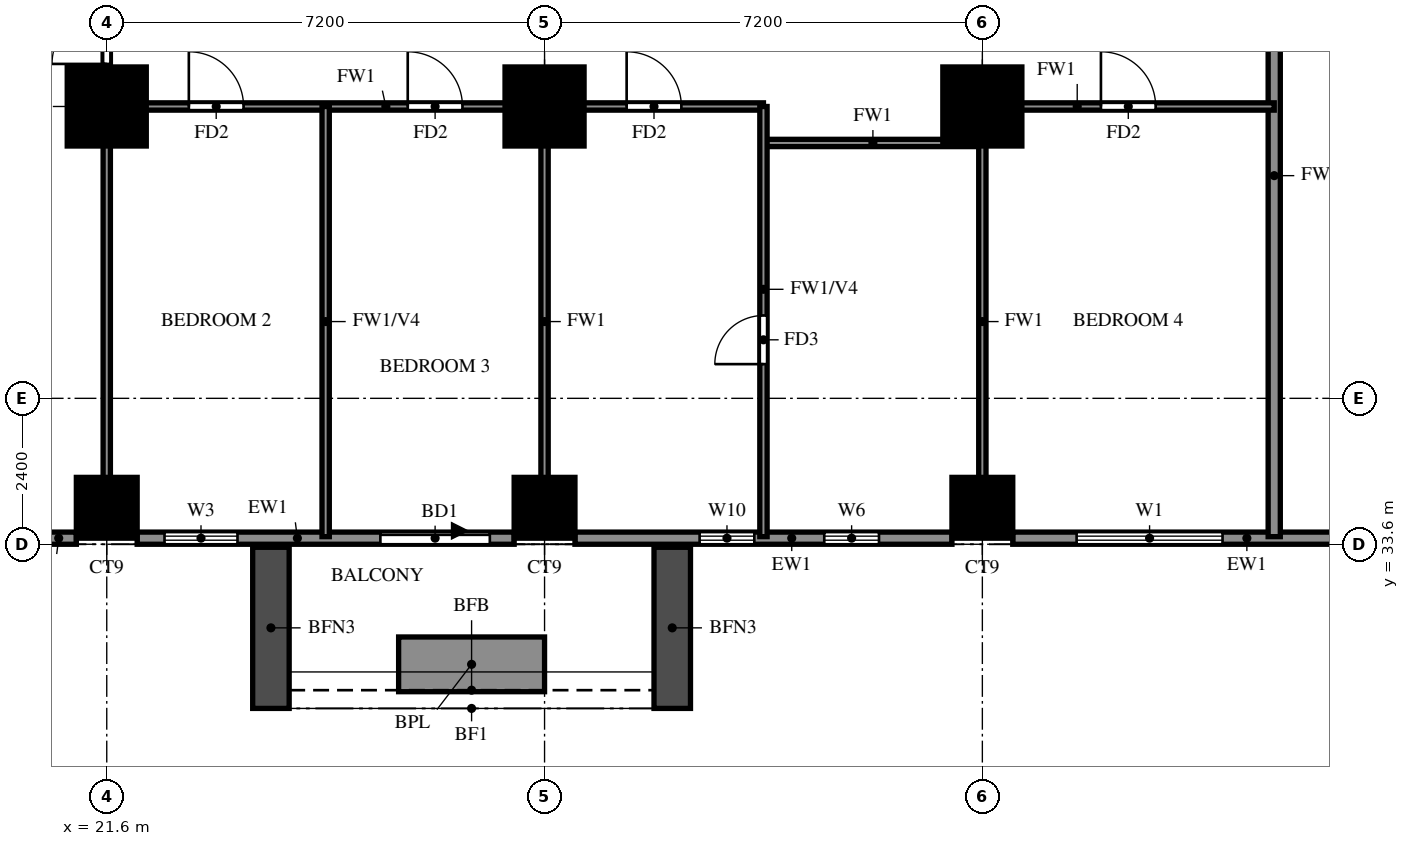
"""IFC4 building model, lengths in metres.
Left out: names, types, materials, properties, quantities, classifications, styles, units other than length and angle.
Written with IfcOpenShell. Run it as: python <this file> out.ifc"""

import sys

from ifc_helpers import new_model, si_unit, direction, frame, frame_2d, origin, origin_2d, place, context, subcontext, project, spatial, rectangle, extrude, source, transform, mapped, element, fill, save


model = new_model("IFC4")
c1 = context("Model", 3, precision=1e-05, world=origin(), true_north=direction((0.0, 1.0)))
c2 = subcontext(c1, "Body", "Model", "MODEL_VIEW")
j1 = project(units=[si_unit("LENGTHUNIT", "METRE"), si_unit("PLANEANGLEUNIT", "RADIAN")], contexts=[c1])
p1 = place(None, origin())
s1 = spatial("IfcSite", under=j1, at=p1, CompositionType="ELEMENT")
p2 = place(p1, origin())
s2 = spatial("IfcBuilding", under=s1, at=p2, CompositionType="ELEMENT")
p3 = place(p2, frame((0.0, 0.0, 69.0)))
s3 = spatial("IfcBuildingStorey", under=s2, at=p3, CompositionType="ELEMENT", Elevation=69.0)
m1 = source(origin(), c2, "Body", "SweptSolid", [
    extrude(rectangle(XDim=1.0, YDim=1.0, at=origin_2d()), origin(), (0.0, 0.0, 1.0), 3.18),
])
for number, where, z_axis, x_axis in (
    (1, (21.6, 34.2, 0.0), (0.0, 0.0, 1.0), (1.0, 0.0, 0.0)),
    (2, (28.8, 34.2, 0.0), (0.0, 0.0, 1.0), (1.0, 0.0, 0.0)),
    (3, (36.0, 34.2, 0.0), (0.0, 0.0, 1.0), (1.0, 0.0, 0.0)),
):
    element("IfcColumn", number, at=place(p3, frame(where, z_axis=z_axis, x_axis=x_axis)), inside=s3, PredefinedType="COLUMN", context=c2, shape_type="MappedRepresentation", body=[
        mapped(m1, transform((0.0, 0.0, 0.0))),
    ])
m2 = source(origin(), c2, "Body", "SweptSolid", [
    extrude(rectangle(XDim=1.3, YDim=1.3, at=origin_2d()), origin(), (0.0, 0.0, 1.0), 3.18),
])
for number, where, z_axis, x_axis in (
    (4, (21.6, 40.8, 0.0), (0.0, 0.0, 1.0), (1.0, 0.0, 0.0)),
    (5, (28.8, 40.8, 0.0), (0.0, 0.0, 1.0), (1.0, 0.0, 0.0)),
    (6, (36.0, 40.8, 0.0), (0.0, 0.0, 1.0), (1.0, 0.0, 0.0)),
):
    element("IfcColumn", number, at=place(p3, frame(where, z_axis=z_axis, x_axis=x_axis)), inside=s3, PredefinedType="COLUMN", context=c2, shape_type="MappedRepresentation", body=[
        mapped(m2, transform((0.0, 0.0, 0.0))),
    ])
p4 = place(p3, frame((18.2, 33.7, 0.0), z_axis=(0.0, 0.0, 1.0), x_axis=(1.0, 0.0, 0.0)))
e7 = element("IfcWall", 7, at=p4, inside=s3, PredefinedType="SOLIDWALL", context=c2, shape_type="SweptSolid", body=[
    extrude(rectangle(XDim=2.9, YDim=0.2, at=frame_2d((1.45, 0.0))), origin(), (0.0, 0.0, 1.0), 3.18),
])
p5 = place(p4, frame((0.55, 0.0, 0.6)))
e8 = element("IfcOpeningElement", 8, at=p5, cuts=e7, PredefinedType="OPENING", context=c2, shape_type="SweptSolid", body=[
    extrude(rectangle(XDim=1.8, YDim=2.4, at=frame_2d((0.9, 1.2))), frame((0.0, 0.11, 0.0), z_axis=(0.0, -1.0, 0.0), x_axis=(1.0, 0.0, 0.0)), (0.0, 0.0, 1.0), 0.22),
])
p6 = place(p3, frame((22.1, 33.7, 0.0), z_axis=(0.0, 0.0, 1.0), x_axis=(1.0, 0.0, 0.0)))
e9 = element("IfcWall", 9, at=p6, inside=s3, PredefinedType="SOLIDWALL", context=c2, shape_type="SweptSolid", body=[
    extrude(rectangle(XDim=6.2, YDim=0.2, at=frame_2d((3.1, 0.0))), origin(), (0.0, 0.0, 1.0), 3.18),
])
p7 = place(p6, frame((4.0, 0.0, 0.0)))
e10 = element("IfcOpeningElement", 10, at=p7, cuts=e9, PredefinedType="OPENING", context=c2, shape_type="SweptSolid", body=[
    extrude(rectangle(XDim=1.8, YDim=2.4, at=frame_2d((0.9, 1.2))), frame((0.0, 0.11, 0.0), z_axis=(0.0, -1.0, 0.0), x_axis=(1.0, 0.0, 0.0)), (0.0, 0.0, 1.0), 0.22),
])
p8 = place(p6, frame((0.45, 0.0, 0.6)))
e11 = element("IfcOpeningElement", 11, at=p8, cuts=e9, PredefinedType="OPENING", context=c2, shape_type="SweptSolid", body=[
    extrude(rectangle(XDim=1.2, YDim=2.4, at=frame_2d((0.6, 1.2))), frame((0.0, 0.11, 0.0), z_axis=(0.0, -1.0, 0.0), x_axis=(1.0, 0.0, 0.0)), (0.0, 0.0, 1.0), 0.22),
])
p9 = place(p3, frame((29.3, 33.7, 0.0), z_axis=(0.0, 0.0, 1.0), x_axis=(1.0, 0.0, 0.0)))
e12 = element("IfcWall", 12, at=p9, inside=s3, PredefinedType="SOLIDWALL", context=c2, shape_type="SweptSolid", body=[
    extrude(rectangle(XDim=6.2, YDim=0.2, at=frame_2d((3.1, 0.0))), origin(), (0.0, 0.0, 1.0), 3.18),
])
p10 = place(p9, frame((2.05, 0.0, 0.6)))
e13 = element("IfcOpeningElement", 13, at=p10, cuts=e12, PredefinedType="OPENING", context=c2, shape_type="SweptSolid", body=[
    extrude(rectangle(XDim=0.9, YDim=2.4, at=frame_2d((0.45, 1.2))), frame((0.0, 0.11, 0.0), z_axis=(0.0, -1.0, 0.0), x_axis=(1.0, 0.0, 0.0)), (0.0, 0.0, 1.0), 0.22),
])
p11 = place(p9, frame((4.1, 0.0, 1.5)))
e14 = element("IfcOpeningElement", 14, at=p11, cuts=e12, PredefinedType="OPENING", context=c2, shape_type="SweptSolid", body=[
    extrude(rectangle(XDim=0.9, YDim=0.9, at=frame_2d((0.45, 0.45))), frame((0.0, 0.11, 0.0), z_axis=(0.0, -1.0, 0.0), x_axis=(1.0, 0.0, 0.0)), (0.0, 0.0, 1.0), 0.22),
])
p12 = place(p3, frame((36.5, 33.7, 0.0), z_axis=(0.0, 0.0, 1.0), x_axis=(1.0, 0.0, 0.0)))
e15 = element("IfcWall", 15, at=p12, inside=s3, PredefinedType="SOLIDWALL", context=c2, shape_type="SweptSolid", body=[
    extrude(rectangle(XDim=5.5, YDim=0.2, at=frame_2d((2.75, 0.0))), origin(), (0.0, 0.0, 1.0), 3.18),
])
p13 = place(p12, frame((1.05, 0.0, 0.6)))
e16 = element("IfcOpeningElement", 16, at=p13, cuts=e15, PredefinedType="OPENING", context=c2, shape_type="SweptSolid", body=[
    extrude(rectangle(XDim=2.4, YDim=2.4, at=frame_2d((1.2, 1.2))), frame((0.0, 0.11, 0.0), z_axis=(0.0, -1.0, 0.0), x_axis=(1.0, 0.0, 0.0)), (0.0, 0.0, 1.0), 0.22),
])
for number, where, z_axis, x_axis in (
    (17, (24.3, 33.55, 0.0), (0.0, 0.0, 1.0), (0.0, -1.0, 0.0)),
    (18, (30.9, 33.55, 0.0), (0.0, 0.0, 1.0), (0.0, -1.0, 0.0)),
):
    element("IfcWall", number, at=place(p3, frame(where, z_axis=z_axis, x_axis=x_axis)), inside=s3, PredefinedType="SOLIDWALL", context=c2, shape_type="SweptSolid", body=[
        extrude(rectangle(XDim=2.65, YDim=0.6, at=frame_2d((1.325, 0.0))), origin(), (0.0, 0.0, 1.0), 2.85),
    ])
p14 = place(p3, frame((26.4, 31.625, 0.0), z_axis=(0.0, 0.0, 1.0), x_axis=(1.0, 0.0, 0.0)))
e19 = element("IfcWall", 19, at=p14, inside=s3, PredefinedType="SOLIDWALL", context=c2, shape_type="SweptSolid", body=[
    extrude(rectangle(XDim=2.4, YDim=0.9, at=frame_2d((1.2, 0.0))), origin(), (0.0, 0.0, 1.0), 0.9),
])
p15 = place(p3, frame((40.8, 33.725, 0.0), z_axis=(0.0, 0.0, 1.0), x_axis=(0.0, 1.0, 0.0)))
e20 = element("IfcWall", 20, at=p15, inside=s3, PredefinedType="SOLIDWALL", context=c2, shape_type="SweptSolid", body=[
    extrude(rectangle(XDim=11.875, YDim=0.2, at=frame_2d((5.938, 0.0))), origin(), (0.0, 0.0, 1.0), 2.28),
])
p16 = place(p15, frame((10.025, 0.0, 0.0)))
e21 = element("IfcOpeningElement", 21, at=p16, cuts=e20, PredefinedType="OPENING", context=c2, shape_type="SweptSolid", body=[
    extrude(rectangle(XDim=1.0, YDim=2.1, at=frame_2d((0.5, 1.05))), frame((0.0, 0.11, 0.0), z_axis=(0.0, -1.0, 0.0), x_axis=(1.0, 0.0, 0.0)), (0.0, 0.0, 1.0), 0.22),
])
p17 = place(p3, frame((32.4, 40.2, 0.0), z_axis=(0.0, 0.0, 1.0), x_axis=(1.0, 0.0, 0.0)))
e22 = element("IfcWall", 22, at=p17, inside=s3, PredefinedType="PARTITIONING", context=c2, shape_type="SweptSolid", body=[
    extrude(rectangle(XDim=3.6, YDim=0.12, at=frame_2d((1.8, 0.0))), origin(), (0.0, 0.0, 1.0), 3.18),
])
p18 = place(p3, frame((21.6, 40.8, 0.0), z_axis=(0.0, 0.0, 1.0), x_axis=(1.0, 0.0, 0.0)))
e23 = element("IfcWall", 23, at=p18, inside=s3, PredefinedType="PARTITIONING", context=c2, shape_type="SweptSolid", body=[
    extrude(rectangle(XDim=10.8, YDim=0.12, at=frame_2d((5.4, 0.0))), origin(), (0.0, 0.0, 1.0), 3.18),
])
p19 = place(p18, frame((1.35, 0.0, 0.0)))
e24 = element("IfcOpeningElement", 24, at=p19, cuts=e23, PredefinedType="OPENING", context=c2, shape_type="SweptSolid", body=[
    extrude(rectangle(XDim=0.9, YDim=2.1, at=frame_2d((0.45, 1.05))), frame((0.0, 0.07, 0.0), z_axis=(0.0, -1.0, 0.0), x_axis=(1.0, 0.0, 0.0)), (0.0, 0.0, 1.0), 0.14),
])
p20 = place(p18, frame((4.95, 0.0, 0.0)))
e25 = element("IfcOpeningElement", 25, at=p20, cuts=e23, PredefinedType="OPENING", context=c2, shape_type="SweptSolid", body=[
    extrude(rectangle(XDim=0.9, YDim=2.1, at=frame_2d((0.45, 1.05))), frame((0.0, 0.07, 0.0), z_axis=(0.0, -1.0, 0.0), x_axis=(1.0, 0.0, 0.0)), (0.0, 0.0, 1.0), 0.14),
])
p21 = place(p18, frame((8.55, 0.0, 0.0)))
e26 = element("IfcOpeningElement", 26, at=p21, cuts=e23, PredefinedType="OPENING", context=c2, shape_type="SweptSolid", body=[
    extrude(rectangle(XDim=0.9, YDim=2.1, at=frame_2d((0.45, 1.05))), frame((0.0, 0.07, 0.0), z_axis=(0.0, -1.0, 0.0), x_axis=(1.0, 0.0, 0.0)), (0.0, 0.0, 1.0), 0.14),
])
p22 = place(p3, frame((36.0, 40.8, 0.0), z_axis=(0.0, 0.0, 1.0), x_axis=(1.0, 0.0, 0.0)))
e27 = element("IfcWall", 27, at=p22, inside=s3, PredefinedType="PARTITIONING", context=c2, shape_type="SweptSolid", body=[
    extrude(rectangle(XDim=4.8, YDim=0.12, at=frame_2d((2.4, 0.0))), origin(), (0.0, 0.0, 1.0), 3.18),
])
p23 = place(p22, frame((1.95, 0.0, 0.0)))
e28 = element("IfcOpeningElement", 28, at=p23, cuts=e27, PredefinedType="OPENING", context=c2, shape_type="SweptSolid", body=[
    extrude(rectangle(XDim=0.9, YDim=2.1, at=frame_2d((0.45, 1.05))), frame((0.0, 0.07, 0.0), z_axis=(0.0, -1.0, 0.0), x_axis=(1.0, 0.0, 0.0)), (0.0, 0.0, 1.0), 0.14),
])
p24 = place(p3, frame((21.6, 33.725, 0.0), z_axis=(0.0, 0.0, 1.0), x_axis=(0.0, 1.0, 0.0)))
e29 = element("IfcWall", 29, at=p24, inside=s3, PredefinedType="PARTITIONING", context=c2, shape_type="SweptSolid", body=[
    extrude(rectangle(XDim=39.475, YDim=0.12, at=frame_2d((19.737, 0.0))), origin(), (0.0, 0.0, 1.0), 3.18),
])
p25 = place(p24, frame((7.775, 0.0, 0.0)))
e30 = element("IfcOpeningElement", 30, at=p25, cuts=e29, PredefinedType="OPENING", context=c2, shape_type="SweptSolid", body=[
    extrude(rectangle(XDim=0.9, YDim=2.1, at=frame_2d((0.45, 1.05))), frame((0.0, 0.07, 0.0), z_axis=(0.0, -1.0, 0.0), x_axis=(1.0, 0.0, 0.0)), (0.0, 0.0, 1.0), 0.14),
])
p26 = place(p24, frame((15.625, 0.0, 0.0)))
e31 = element("IfcOpeningElement", 31, at=p26, cuts=e29, PredefinedType="OPENING", context=c2, shape_type="SweptSolid", body=[
    extrude(rectangle(XDim=0.9, YDim=2.1, at=frame_2d((0.45, 1.05))), frame((0.0, 0.07, 0.0), z_axis=(0.0, -1.0, 0.0), x_axis=(1.0, 0.0, 0.0)), (0.0, 0.0, 1.0), 0.14),
])
p27 = place(p24, frame((19.225, 0.0, 0.0)))
e32 = element("IfcOpeningElement", 32, at=p27, cuts=e29, PredefinedType="OPENING", context=c2, shape_type="SweptSolid", body=[
    extrude(rectangle(XDim=0.9, YDim=2.1, at=frame_2d((0.45, 1.05))), frame((0.0, 0.07, 0.0), z_axis=(0.0, -1.0, 0.0), x_axis=(1.0, 0.0, 0.0)), (0.0, 0.0, 1.0), 0.14),
])
p28 = place(p24, frame((24.325, 0.0, 0.0)))
e33 = element("IfcOpeningElement", 33, at=p28, cuts=e29, PredefinedType="OPENING", context=c2, shape_type="SweptSolid", body=[
    extrude(rectangle(XDim=1.5, YDim=2.1, at=frame_2d((0.75, 1.05))), frame((0.0, 0.07, 0.0), z_axis=(0.0, -1.0, 0.0), x_axis=(1.0, 0.0, 0.0)), (0.0, 0.0, 1.0), 0.14),
])
p29 = place(p24, frame((30.025, 0.0, 0.0)))
e34 = element("IfcOpeningElement", 34, at=p29, cuts=e29, PredefinedType="OPENING", context=c2, shape_type="SweptSolid", body=[
    extrude(rectangle(XDim=0.9, YDim=2.1, at=frame_2d((0.45, 1.05))), frame((0.0, 0.07, 0.0), z_axis=(0.0, -1.0, 0.0), x_axis=(1.0, 0.0, 0.0)), (0.0, 0.0, 1.0), 0.14),
])
p30 = place(p24, frame((33.625, 0.0, 0.0)))
e35 = element("IfcOpeningElement", 35, at=p30, cuts=e29, PredefinedType="OPENING", context=c2, shape_type="SweptSolid", body=[
    extrude(rectangle(XDim=0.9, YDim=2.1, at=frame_2d((0.45, 1.05))), frame((0.0, 0.07, 0.0), z_axis=(0.0, -1.0, 0.0), x_axis=(1.0, 0.0, 0.0)), (0.0, 0.0, 1.0), 0.14),
])
p31 = place(p24, frame((37.225, 0.0, 0.0)))
e36 = element("IfcOpeningElement", 36, at=p31, cuts=e29, PredefinedType="OPENING", context=c2, shape_type="SweptSolid", body=[
    extrude(rectangle(XDim=0.9, YDim=2.1, at=frame_2d((0.45, 1.05))), frame((0.0, 0.07, 0.0), z_axis=(0.0, -1.0, 0.0), x_axis=(1.0, 0.0, 0.0)), (0.0, 0.0, 1.0), 0.14),
])
p32 = place(p3, frame((25.2, 33.725, 0.0), z_axis=(0.0, 0.0, 1.0), x_axis=(0.0, 1.0, 0.0)))
e37 = element("IfcWall", 37, at=p32, inside=s3, PredefinedType="PARTITIONING", context=c2, shape_type="SweptSolid", body=[
    extrude(rectangle(XDim=7.075, YDim=0.12, at=frame_2d((3.538, 0.0))), origin(), (0.0, 0.0, 1.0), 2.28),
])
p33 = place(p3, frame((28.8, 33.725, 0.0), z_axis=(0.0, 0.0, 1.0), x_axis=(0.0, 1.0, 0.0)))
e38 = element("IfcWall", 38, at=p33, inside=s3, PredefinedType="PARTITIONING", context=c2, shape_type="SweptSolid", body=[
    extrude(rectangle(XDim=7.075, YDim=0.12, at=frame_2d((3.538, 0.0))), origin(), (0.0, 0.0, 1.0), 3.18),
])
p34 = place(p3, frame((32.4, 33.725, 0.0), z_axis=(0.0, 0.0, 1.0), x_axis=(0.0, 1.0, 0.0)))
e39 = element("IfcWall", 39, at=p34, inside=s3, PredefinedType="PARTITIONING", context=c2, shape_type="SweptSolid", body=[
    extrude(rectangle(XDim=7.075, YDim=0.12, at=frame_2d((3.538, 0.0))), origin(), (0.0, 0.0, 1.0), 2.28),
])
p35 = place(p34, frame((2.837, 0.0, 0.0)))
e40 = element("IfcOpeningElement", 40, at=p35, cuts=e39, PredefinedType="OPENING", context=c2, shape_type="SweptSolid", body=[
    extrude(rectangle(XDim=0.8, YDim=2.1, at=frame_2d((0.4, 1.05))), frame((0.0, 0.07, 0.0), z_axis=(0.0, -1.0, 0.0), x_axis=(1.0, 0.0, 0.0)), (0.0, 0.0, 1.0), 0.14),
])
p36 = place(p3, frame((36.0, 33.725, 0.0), z_axis=(0.0, 0.0, 1.0), x_axis=(0.0, 1.0, 0.0)))
e41 = element("IfcWall", 41, at=p36, inside=s3, PredefinedType="PARTITIONING", context=c2, shape_type="SweptSolid", body=[
    extrude(rectangle(XDim=7.075, YDim=0.12, at=frame_2d((3.538, 0.0))), origin(), (0.0, 0.0, 1.0), 3.18),
])
p37 = place(p7, origin())
e42 = element("IfcDoor", 42, at=p37, inside=s3, OperationType="DOUBLE_DOOR_SLIDING", PredefinedType="DOOR", context=c2, shape_type="SweptSolid", body=[
    extrude(rectangle(XDim=1.8, YDim=2.4, at=frame_2d((0.9, 1.2))), frame((0.0, 0.025, 0.0), z_axis=(0.0, -1.0, 0.0), x_axis=(1.0, 0.0, 0.0)), (0.0, 0.0, 1.0), 0.05),
])
fill(e10, e42)
p38 = place(p8, origin())
e43 = element("IfcWindow", 43, at=p38, inside=s3, PartitioningType="SINGLE_PANEL", PredefinedType="WINDOW", context=c2, shape_type="SweptSolid", body=[
    extrude(rectangle(XDim=1.2, YDim=2.4, at=frame_2d((0.6, 1.2))), frame((0.0, 0.03, 0.0), z_axis=(0.0, -1.0, 0.0), x_axis=(1.0, 0.0, 0.0)), (0.0, 0.0, 1.0), 0.06),
])
fill(e11, e43)
p39 = place(p10, origin())
e44 = element("IfcWindow", 44, at=p39, inside=s3, PartitioningType="SINGLE_PANEL", PredefinedType="WINDOW", context=c2, shape_type="SweptSolid", body=[
    extrude(rectangle(XDim=0.9, YDim=2.4, at=frame_2d((0.45, 1.2))), frame((0.0, 0.03, 0.0), z_axis=(0.0, -1.0, 0.0), x_axis=(1.0, 0.0, 0.0)), (0.0, 0.0, 1.0), 0.06),
])
fill(e13, e44)
p40 = place(p11, origin())
e45 = element("IfcWindow", 45, at=p40, inside=s3, PartitioningType="SINGLE_PANEL", PredefinedType="WINDOW", context=c2, shape_type="SweptSolid", body=[
    extrude(rectangle(XDim=0.9, YDim=0.9, at=frame_2d((0.45, 0.45))), frame((0.0, 0.03, 0.0), z_axis=(0.0, -1.0, 0.0), x_axis=(1.0, 0.0, 0.0)), (0.0, 0.0, 1.0), 0.06),
])
fill(e14, e45)
p41 = place(p13, origin())
e46 = element("IfcWindow", 46, at=p41, inside=s3, PartitioningType="DOUBLE_PANEL_VERTICAL", PredefinedType="WINDOW", context=c2, shape_type="SweptSolid", body=[
    extrude(rectangle(XDim=2.4, YDim=2.4, at=frame_2d((1.2, 1.2))), frame((0.0, 0.03, 0.0), z_axis=(0.0, -1.0, 0.0), x_axis=(1.0, 0.0, 0.0)), (0.0, 0.0, 1.0), 0.06),
])
fill(e16, e46)
p42 = place(p25, origin())
e47 = element("IfcDoor", 47, at=p42, inside=s3, OperationType="SINGLE_SWING_LEFT", PredefinedType="DOOR", context=c2, shape_type="SweptSolid", body=[
    extrude(rectangle(XDim=0.9, YDim=2.1, at=frame_2d((0.45, 1.05))), frame((0.0, 0.025, 0.0), z_axis=(0.0, -1.0, 0.0), x_axis=(1.0, 0.0, 0.0)), (0.0, 0.0, 1.0), 0.05),
])
fill(e30, e47)
p43 = place(p19, origin())
e48 = element("IfcDoor", 48, at=p43, inside=s3, OperationType="SINGLE_SWING_LEFT", PredefinedType="DOOR", context=c2, shape_type="SweptSolid", body=[
    extrude(rectangle(XDim=0.9, YDim=2.1, at=frame_2d((0.45, 1.05))), frame((0.0, 0.025, 0.0), z_axis=(0.0, -1.0, 0.0), x_axis=(1.0, 0.0, 0.0)), (0.0, 0.0, 1.0), 0.05),
])
fill(e24, e48)
p44 = place(p20, origin())
e49 = element("IfcDoor", 49, at=p44, inside=s3, OperationType="SINGLE_SWING_LEFT", PredefinedType="DOOR", context=c2, shape_type="SweptSolid", body=[
    extrude(rectangle(XDim=0.9, YDim=2.1, at=frame_2d((0.45, 1.05))), frame((0.0, 0.025, 0.0), z_axis=(0.0, -1.0, 0.0), x_axis=(1.0, 0.0, 0.0)), (0.0, 0.0, 1.0), 0.05),
])
fill(e25, e49)
p45 = place(p21, origin())
e50 = element("IfcDoor", 50, at=p45, inside=s3, OperationType="SINGLE_SWING_RIGHT", PredefinedType="DOOR", context=c2, shape_type="SweptSolid", body=[
    extrude(rectangle(XDim=0.9, YDim=2.1, at=frame_2d((0.45, 1.05))), frame((0.0, 0.025, 0.0), z_axis=(0.0, -1.0, 0.0), x_axis=(1.0, 0.0, 0.0)), (0.0, 0.0, 1.0), 0.05),
])
fill(e26, e50)
p46 = place(p35, origin())
e51 = element("IfcDoor", 51, at=p46, inside=s3, OperationType="SINGLE_SWING_LEFT", PredefinedType="DOOR", context=c2, shape_type="SweptSolid", body=[
    extrude(rectangle(XDim=0.8, YDim=2.1, at=frame_2d((0.4, 1.05))), frame((0.0, 0.025, 0.0), z_axis=(0.0, -1.0, 0.0), x_axis=(1.0, 0.0, 0.0)), (0.0, 0.0, 1.0), 0.05),
])
fill(e40, e51)
p47 = place(p23, origin())
e52 = element("IfcDoor", 52, at=p47, inside=s3, OperationType="SINGLE_SWING_LEFT", PredefinedType="DOOR", context=c2, shape_type="SweptSolid", body=[
    extrude(rectangle(XDim=0.9, YDim=2.1, at=frame_2d((0.45, 1.05))), frame((0.0, 0.025, 0.0), z_axis=(0.0, -1.0, 0.0), x_axis=(1.0, 0.0, 0.0)), (0.0, 0.0, 1.0), 0.05),
])
fill(e28, e52)
save(model, sys.argv[1])
